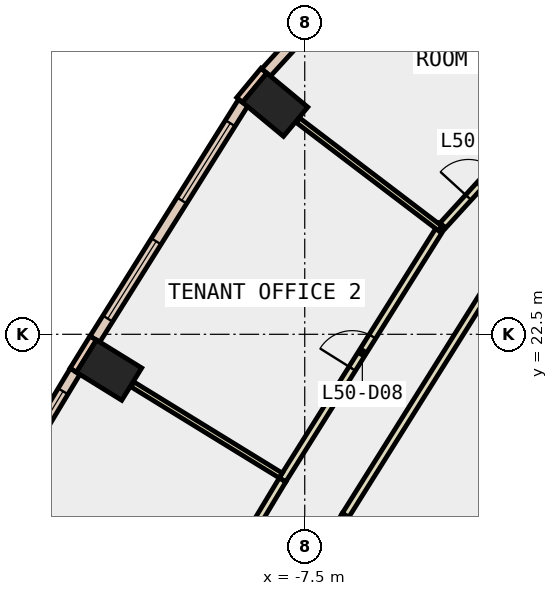
"""IFC4 building model, lengths in metres.
Left out: names, types, materials, properties, quantities, classifications, styles, units other than length and angle.
Written with IfcOpenShell. Run it as: python <this file> out.ifc"""

import sys

from ifc_helpers import new_model, si_unit, direction, frame, frame_2d, origin, origin_2d, place, context, subcontext, project, spatial, rectangle, extrude, element, fill, save


model = new_model("IFC4")
c1 = context("Model", 3, precision=1e-05, world=origin(), true_north=direction((0.0, 1.0)))
c2 = subcontext(c1, "Body", "Model", "MODEL_VIEW")
j1 = project(units=[si_unit("LENGTHUNIT", "METRE"), si_unit("PLANEANGLEUNIT", "RADIAN")], contexts=[c1])
p1 = place(None, origin())
s1 = spatial("IfcSite", under=j1, at=p1, CompositionType="ELEMENT")
p2 = place(p1, origin())
s2 = spatial("IfcBuilding", under=s1, at=p2, CompositionType="ELEMENT")
p3 = place(p2, frame((0.0, 0.0, 223.4)))
s3 = spatial("IfcBuildingStorey", under=s2, at=p3, CompositionType="ELEMENT", Elevation=223.4)
for number, where, z_axis, x_axis in (
    (1, (-8.278, 28.54, -0.4), (0.0, 0.0, 1.0), (0.639, 0.769, 0.0)),
    (2, (-12.648, 21.557, -0.4), (0.0, 0.0, 1.0), (0.525, 0.851, 0.0)),
):
    element("IfcColumn", number, at=place(p3, frame(where, z_axis=z_axis, x_axis=x_axis)), inside=s3, PredefinedType="COLUMN", context=c2, shape_type="SweptSolid", body=[
        extrude(rectangle(XDim=1.0, YDim=1.4, at=origin_2d()), origin(), (0.0, 0.0, 1.0), 4.2),
    ])
p4 = place(p3, frame((-8.575, 29.436, 0.0), z_axis=(0.0, 0.0, 1.0), x_axis=(-0.637972365578, -0.770059257953, 0.0)))
e3 = element("IfcWall", 3, at=p4, inside=s3, PredefinedType="STANDARD", context=c2, shape_type="SweptSolid", body=[
    extrude(rectangle(XDim=1.0, YDim=0.2, at=frame_2d((0.5, 0.0))), origin(), (0.0, 0.0, 1.0), 3.8),
])
p5 = place(p3, frame((-13.066, 22.403, 0.0), z_axis=(0.0, 0.0, 1.0), x_axis=(-0.525825307325, -0.850592585306, 0.0)))
e4 = element("IfcWall", 4, at=p5, inside=s3, PredefinedType="STANDARD", context=c2, shape_type="SweptSolid", body=[
    extrude(rectangle(XDim=1.0, YDim=0.2, at=frame_2d((0.5, 0.0))), origin(), (0.0, 0.0, 1.0), 3.8),
])
p6 = place(p3, frame((-5.653, 32.524, 0.0), z_axis=(0.0, 0.0, 1.0), x_axis=(-0.674487390017, -0.738286367684, 0.0)))
e5 = element("IfcWall", 5, at=p6, inside=s3, PredefinedType="STANDARD", context=c2, shape_type="SweptSolid", body=[
    extrude(rectangle(XDim=4.248, YDim=0.3, at=frame_2d((2.124, 0.0))), origin(), (0.0, 0.0, 1.0), 3.8),
])
p7 = place(p6, frame((1.424, 0.0, 0.9)))
e6 = element("IfcOpeningElement", 6, at=p7, cuts=e5, PredefinedType="OPENING", context=c2, shape_type="SweptSolid", body=[
    extrude(rectangle(XDim=1.4, YDim=2.6, at=frame_2d((0.7, 1.3))), frame((0.0, 0.16, 0.0), z_axis=(0.0, -1.0, 0.0), x_axis=(1.0, 0.0, 0.0)), (0.0, 0.0, 1.0), 0.32),
])
p8 = place(p3, frame((-9.122, 28.592, 0.0), z_axis=(0.0, 0.0, 1.0), x_axis=(-0.531239262679, -0.847221839773, 0.0)))
e7 = element("IfcWall", 7, at=p8, inside=s3, PredefinedType="STANDARD", context=c2, shape_type="SweptSolid", body=[
    extrude(rectangle(XDim=7.339, YDim=0.3, at=frame_2d((3.67, 0.0))), origin(), (0.0, 0.0, 1.0), 3.8),
])
p9 = place(p8, frame((0.635, 0.0, 0.9)))
e8 = element("IfcOpeningElement", 8, at=p9, cuts=e7, PredefinedType="OPENING", context=c2, shape_type="SweptSolid", body=[
    extrude(rectangle(XDim=2.4, YDim=2.6, at=frame_2d((1.2, 1.3))), frame((0.0, 0.16, 0.0), z_axis=(0.0, -1.0, 0.0), x_axis=(1.0, 0.0, 0.0)), (0.0, 0.0, 1.0), 0.32),
])
p10 = place(p8, frame((4.304, 0.0, 0.9)))
e9 = element("IfcOpeningElement", 9, at=p10, cuts=e7, PredefinedType="OPENING", context=c2, shape_type="SweptSolid", body=[
    extrude(rectangle(XDim=2.4, YDim=2.6, at=frame_2d((1.2, 1.3))), frame((0.0, 0.16, 0.0), z_axis=(0.0, -1.0, 0.0), x_axis=(1.0, 0.0, 0.0)), (0.0, 0.0, 1.0), 0.32),
])
p11 = place(p3, frame((-13.544, 21.524, 0.0), z_axis=(0.0, 0.0, 1.0), x_axis=(-0.515560283412, -0.856853309597, 0.0)))
e10 = element("IfcWall", 10, at=p11, inside=s3, PredefinedType="STANDARD", context=c2, shape_type="SweptSolid", body=[
    extrude(rectangle(XDim=7.249, YDim=0.3, at=frame_2d((3.624, 0.0))), origin(), (0.0, 0.0, 1.0), 3.8),
])
p12 = place(p11, frame((0.612, 0.0, 0.9)))
e11 = element("IfcOpeningElement", 11, at=p12, cuts=e10, PredefinedType="OPENING", context=c2, shape_type="SweptSolid", body=[
    extrude(rectangle(XDim=2.4, YDim=2.6, at=frame_2d((1.2, 1.3))), frame((0.0, 0.16, 0.0), z_axis=(0.0, -1.0, 0.0), x_axis=(1.0, 0.0, 0.0)), (0.0, 0.0, 1.0), 0.32),
])
p13 = place(p11, frame((4.236, 0.0, 0.9)))
e12 = element("IfcOpeningElement", 12, at=p13, cuts=e10, PredefinedType="OPENING", context=c2, shape_type="SweptSolid", body=[
    extrude(rectangle(XDim=2.4, YDim=2.6, at=frame_2d((1.2, 1.3))), frame((0.0, 0.16, 0.0), z_axis=(0.0, -1.0, 0.0), x_axis=(1.0, 0.0, 0.0)), (0.0, 0.0, 1.0), 0.32),
])
p14 = place(p3, frame((-2.364, 24.216, 0.0), z_axis=(0.0, 0.0, 1.0), x_axis=(-0.531335643981, -0.847161397512, 0.0)))
e13 = element("IfcWall", 13, at=p14, inside=s3, PredefinedType="PARTITIONING", context=c2, shape_type="SweptSolid", body=[
    extrude(rectangle(XDim=7.647, YDim=0.2, at=frame_2d((3.823, 0.0))), origin(), (0.0, 0.0, 1.0), 3.8),
])
p15 = place(p3, frame((-6.427, 17.738, 0.0), z_axis=(0.0, 0.0, 1.0), x_axis=(-0.515416266777, -0.85693994652, 0.0)))
e14 = element("IfcWall", 14, at=p15, inside=s3, PredefinedType="PARTITIONING", context=c2, shape_type="SweptSolid", body=[
    extrude(rectangle(XDim=3.587, YDim=0.2, at=frame_2d((1.793, 0.0))), origin(), (0.0, 0.0, 1.0), 3.8),
])
p16 = place(p3, frame((-3.869, 25.36, 0.0), z_axis=(0.0, 0.0, 1.0), x_axis=(0.674594755709, 0.738188265668, 0.0)))
e15 = element("IfcWall", 15, at=p16, inside=s3, PredefinedType="PARTITIONING", context=c2, shape_type="SweptSolid", body=[
    extrude(rectangle(XDim=3.006, YDim=0.2, at=frame_2d((1.503, 0.0))), origin(), (0.0, 0.0, 1.0), 3.8),
])
p17 = place(p16, frame((1.003, 0.0, 0.0)))
e16 = element("IfcOpeningElement", 16, at=p17, cuts=e15, PredefinedType="OPENING", context=c2, shape_type="SweptSolid", body=[
    extrude(rectangle(XDim=1.0, YDim=2.1, at=frame_2d((0.5, 1.05))), frame((0.0, 0.11, 0.0), z_axis=(0.0, -1.0, 0.0), x_axis=(1.0, 0.0, 0.0)), (0.0, 0.0, 1.0), 0.22),
])
p18 = place(p3, frame((-8.086, 18.669, 0.0), z_axis=(0.0, 0.0, 1.0), x_axis=(0.531329962263, 0.847164961033, 0.0)))
e17 = element("IfcWall", 17, at=p18, inside=s3, PredefinedType="PARTITIONING", context=c2, shape_type="SweptSolid", body=[
    extrude(rectangle(XDim=7.91, YDim=0.2, at=frame_2d((3.955, 0.0))), origin(), (0.0, 0.0, 1.0), 3.8),
])
p19 = place(p18, frame((3.455, 0.0, 0.0)))
e18 = element("IfcOpeningElement", 18, at=p19, cuts=e17, PredefinedType="OPENING", context=c2, shape_type="SweptSolid", body=[
    extrude(rectangle(XDim=1.0, YDim=2.1, at=frame_2d((0.5, 1.05))), frame((0.0, 0.11, 0.0), z_axis=(0.0, -1.0, 0.0), x_axis=(1.0, 0.0, 0.0)), (0.0, 0.0, 1.0), 0.22),
])
p20 = place(p3, frame((-12.239, 11.763, 0.0), z_axis=(0.0, 0.0, 1.0), x_axis=(0.515591302858, 0.856834644734, 0.0)))
e19 = element("IfcWall", 19, at=p20, inside=s3, PredefinedType="PARTITIONING", context=c2, shape_type="SweptSolid", body=[
    extrude(rectangle(XDim=8.059, YDim=0.2, at=frame_2d((4.029, 0.0))), origin(), (0.0, 0.0, 1.0), 3.8),
])
p21 = place(p20, frame((3.604, 0.0, 0.0)))
e20 = element("IfcOpeningElement", 20, at=p21, cuts=e19, PredefinedType="OPENING", context=c2, shape_type="SweptSolid", body=[
    extrude(rectangle(XDim=1.0, YDim=2.1, at=frame_2d((0.5, 1.05))), frame((0.0, 0.11, 0.0), z_axis=(0.0, -1.0, 0.0), x_axis=(1.0, 0.0, 0.0)), (0.0, 0.0, 1.0), 0.22),
])
p22 = place(p3, frame((-3.936, 25.286, 0.0), z_axis=(0.0, 0.0, 1.0), x_axis=(-0.795977117067, 0.605326712698, 0.0)))
e21 = element("IfcWall", 21, at=p22, inside=s3, PredefinedType="PARTITIONING", context=c2, shape_type="SweptSolid", body=[
    extrude(rectangle(XDim=4.704, YDim=0.15, at=frame_2d((2.352, 0.0))), origin(), (0.0, 0.0, 1.0), 3.8),
])
p23 = place(p3, frame((-8.131, 18.784, 0.0), z_axis=(0.0, 0.0, 1.0), x_axis=(-0.851969320918, 0.52359170755, 0.0)))
e22 = element("IfcWall", 22, at=p23, inside=s3, PredefinedType="PARTITIONING", context=c2, shape_type="SweptSolid", body=[
    extrude(rectangle(XDim=4.58, YDim=0.15, at=frame_2d((2.29, 0.0))), origin(), (0.0, 0.0, 1.0), 3.8),
])
p24 = place(p9, origin())
e23 = element("IfcWindow", 23, at=p24, inside=s3, PartitioningType="SINGLE_PANEL", PredefinedType="WINDOW", context=c2, shape_type="SweptSolid", body=[
    extrude(rectangle(XDim=2.4, YDim=2.6, at=frame_2d((1.2, 1.3))), frame((0.0, 0.03, 0.0), z_axis=(0.0, -1.0, 0.0), x_axis=(1.0, 0.0, 0.0)), (0.0, 0.0, 1.0), 0.06),
])
fill(e8, e23)
p25 = place(p10, origin())
e24 = element("IfcWindow", 24, at=p25, inside=s3, PartitioningType="SINGLE_PANEL", PredefinedType="WINDOW", context=c2, shape_type="SweptSolid", body=[
    extrude(rectangle(XDim=2.4, YDim=2.6, at=frame_2d((1.2, 1.3))), frame((0.0, 0.03, 0.0), z_axis=(0.0, -1.0, 0.0), x_axis=(1.0, 0.0, 0.0)), (0.0, 0.0, 1.0), 0.06),
])
fill(e9, e24)
p26 = place(p12, origin())
e25 = element("IfcWindow", 25, at=p26, inside=s3, PartitioningType="SINGLE_PANEL", PredefinedType="WINDOW", context=c2, shape_type="SweptSolid", body=[
    extrude(rectangle(XDim=2.4, YDim=2.6, at=frame_2d((1.2, 1.3))), frame((0.0, 0.03, 0.0), z_axis=(0.0, -1.0, 0.0), x_axis=(1.0, 0.0, 0.0)), (0.0, 0.0, 1.0), 0.06),
])
fill(e11, e25)
p27 = place(p17, origin())
e26 = element("IfcDoor", 26, at=p27, inside=s3, OperationType="SINGLE_SWING_LEFT", PredefinedType="DOOR", context=c2, shape_type="SweptSolid", body=[
    extrude(rectangle(XDim=1.0, YDim=2.1, at=frame_2d((0.5, 1.05))), frame((0.0, 0.025, 0.0), z_axis=(0.0, -1.0, 0.0), x_axis=(1.0, 0.0, 0.0)), (0.0, 0.0, 1.0), 0.05),
])
fill(e16, e26)
p28 = place(p19, origin())
e27 = element("IfcDoor", 27, at=p28, inside=s3, OperationType="SINGLE_SWING_RIGHT", PredefinedType="DOOR", context=c2, shape_type="SweptSolid", body=[
    extrude(rectangle(XDim=1.0, YDim=2.1, at=frame_2d((0.5, 1.05))), frame((0.0, 0.025, 0.0), z_axis=(0.0, -1.0, 0.0), x_axis=(1.0, 0.0, 0.0)), (0.0, 0.0, 1.0), 0.05),
])
fill(e18, e27)
save(model, sys.argv[1])
